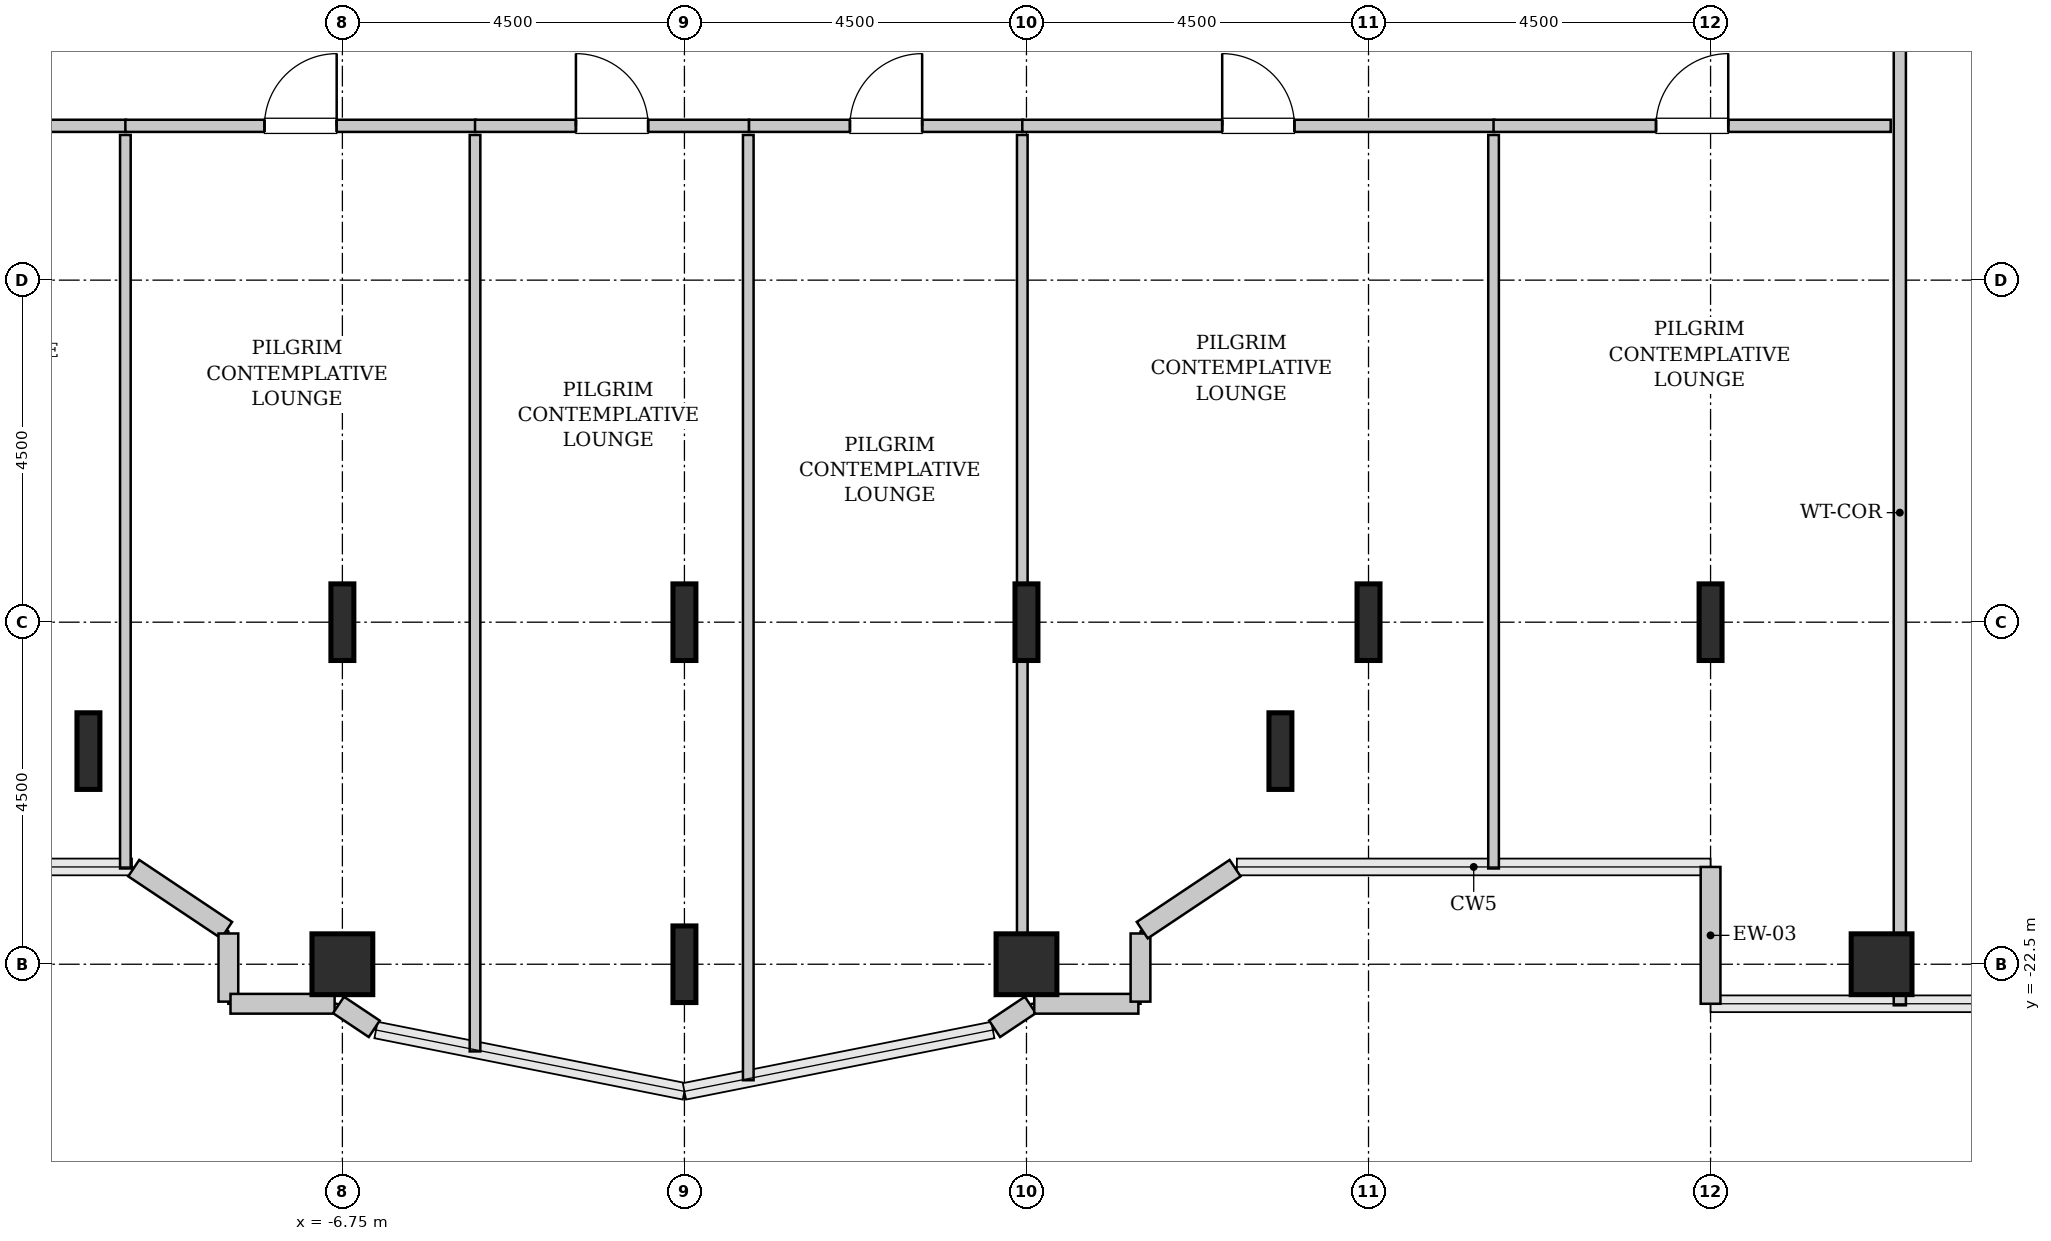
"""IFC4 building model, lengths in metres.
Left out: names, types, materials, properties, quantities, classifications, styles, units other than length and angle.
Written with IfcOpenShell. Run it as: python <this file> out.ifc"""

import sys

from ifc_helpers import new_model, si_unit, direction, frame, frame_2d, origin, origin_2d, place, context, subcontext, project, spatial, rectangle, hollow_rectangle, i_section, extrude, source, transform, mapped, element, fill, save


model = new_model("IFC4")
c1 = context("Model", 3, precision=1e-05, world=origin(), true_north=direction((0.0, 1.0)))
c2 = subcontext(c1, "Body", "Model", "MODEL_VIEW")
j1 = project(units=[si_unit("LENGTHUNIT", "METRE"), si_unit("PLANEANGLEUNIT", "RADIAN")], contexts=[c1])
p1 = place(None, origin())
s1 = spatial("IfcSite", under=j1, at=p1, CompositionType="ELEMENT")
p2 = place(p1, origin())
s2 = spatial("IfcBuilding", under=s1, at=p2, CompositionType="ELEMENT")
p3 = place(p2, frame((0.0, 0.0, 117.4)))
s3 = spatial("IfcBuildingStorey", under=s2, at=p3, CompositionType="ELEMENT", Elevation=117.4)
m1 = source(origin(), c2, "Body", "SweptSolid", [
    extrude(i_section(OverallWidth=0.302, OverallDepth=1.008, WebThickness=0.021, FlangeThickness=0.04, FilletRadius=0.03, at=origin_2d()), origin(), (0.0, 0.0, 1.0), 3.8),
])
p4 = place(p3, frame((-10.091, -19.696, 0.0), z_axis=(0.0, 0.0, 1.0), x_axis=(1.0, 0.0, 0.0)))
e1 = element("IfcColumn", 1, at=p4, inside=s3, PredefinedType="COLUMN", context=c2, shape_type="MappedRepresentation", body=[
    mapped(m1, transform((0.0, 0.0, 0.0), x_axis=(1.0, 0.0, 0.0), y_axis=(0.0, 1.0, 0.0), z_axis=(0.0, 0.0, 1.0), scale=1.0)),
])
m2 = source(origin(), c2, "Body", "SweptSolid", [
    extrude(hollow_rectangle(XDim=0.8, YDim=0.8, WallThickness=0.04, InnerFilletRadius=0.04, OuterFilletRadius=0.08, at=origin_2d()), origin(), (0.0, 0.0, 1.0), 3.8),
])
p5 = place(p3, frame((-6.75, -22.5, 0.0), z_axis=(0.0, 0.0, 1.0), x_axis=(1.0, 0.0, 0.0)))
e2 = element("IfcColumn", 2, at=p5, inside=s3, PredefinedType="COLUMN", context=c2, shape_type="MappedRepresentation", body=[
    mapped(m2, transform((0.0, 0.0, 0.0), x_axis=(1.0, 0.0, 0.0), y_axis=(0.0, 1.0, 0.0), z_axis=(0.0, 0.0, 1.0), scale=1.0)),
])
for number, where, z_axis, x_axis in (
    (3, (-6.75, -18.0, 0.0), (0.0, 0.0, 1.0), (1.0, 0.0, 0.0)),
    (4, (-2.25, -22.5, 0.0), (0.0, 0.0, 1.0), (1.0, 0.0, 0.0)),
    (5, (-2.25, -18.0, 0.0), (0.0, 0.0, 1.0), (1.0, 0.0, 0.0)),
):
    element("IfcColumn", number, at=place(p3, frame(where, z_axis=z_axis, x_axis=x_axis)), inside=s3, PredefinedType="COLUMN", context=c2, shape_type="MappedRepresentation", body=[
        mapped(m1, transform((0.0, 0.0, 0.0), x_axis=(1.0, 0.0, 0.0), y_axis=(0.0, 1.0, 0.0), z_axis=(0.0, 0.0, 1.0), scale=1.0)),
    ])
p6 = place(p3, frame((2.25, -22.5, 0.0), z_axis=(0.0, 0.0, 1.0), x_axis=(1.0, 0.0, 0.0)))
e6 = element("IfcColumn", 6, at=p6, inside=s3, PredefinedType="COLUMN", context=c2, shape_type="MappedRepresentation", body=[
    mapped(m2, transform((0.0, 0.0, 0.0), x_axis=(1.0, 0.0, 0.0), y_axis=(0.0, 1.0, 0.0), z_axis=(0.0, 0.0, 1.0), scale=1.0)),
])
for number, where, z_axis, x_axis in (
    (7, (2.25, -18.0, 0.0), (0.0, 0.0, 1.0), (1.0, 0.0, 0.0)),
    (8, (5.591, -19.696, 0.0), (0.0, 0.0, 1.0), (1.0, 0.0, 0.0)),
    (9, (6.75, -18.0, 0.0), (0.0, 0.0, 1.0), (1.0, 0.0, 0.0)),
    (10, (11.25, -18.0, 0.0), (0.0, 0.0, 1.0), (1.0, 0.0, 0.0)),
):
    element("IfcColumn", number, at=place(p3, frame(where, z_axis=z_axis, x_axis=x_axis)), inside=s3, PredefinedType="COLUMN", context=c2, shape_type="MappedRepresentation", body=[
        mapped(m1, transform((0.0, 0.0, 0.0), x_axis=(1.0, 0.0, 0.0), y_axis=(0.0, 1.0, 0.0), z_axis=(0.0, 0.0, 1.0), scale=1.0)),
    ])
p7 = place(p3, frame((13.5, -22.5, 0.0), z_axis=(0.0, 0.0, 1.0), x_axis=(1.0, 0.0, 0.0)))
e11 = element("IfcColumn", 11, at=p7, inside=s3, PredefinedType="COLUMN", context=c2, shape_type="MappedRepresentation", body=[
    mapped(m2, transform((0.0, 0.0, 0.0), x_axis=(1.0, 0.0, 0.0), y_axis=(0.0, 1.0, 0.0), z_axis=(0.0, 0.0, 1.0), scale=1.0)),
])
m3 = source(origin(), c2, "Body", "SweptSolid", [
    extrude(rectangle(XDim=1.8, YDim=0.26, at=frame_2d((0.9, 0.0))), origin(), (0.0, 0.0, 1.0), 3.55),
])
p8 = place(p3, frame((11.25, -21.22, 0.0), z_axis=(0.0, 0.0, 1.0), x_axis=(0.0, -1.0, 0.0)))
e12 = element("IfcWall", 12, at=p8, inside=s3, PredefinedType="SOLIDWALL", context=c2, shape_type="MappedRepresentation", body=[
    mapped(m3, transform((0.0, 0.0, 0.0), x_axis=(1.0, 0.0, 0.0), y_axis=(0.0, 1.0, 0.0), z_axis=(0.0, 0.0, 1.0), scale=1.0)),
])
m4 = source(origin(), c2, "Body", "SweptSolid", [
    extrude(rectangle(XDim=1.469, YDim=0.26, at=frame_2d((0.734, 0.0))), origin(), (0.0, 0.0, 1.0), 3.55),
])
p9 = place(p3, frame((-9.495, -21.236, 0.0), z_axis=(0.0, 0.0, 1.0), x_axis=(0.831461760506, -0.555581983884, 0.0)))
e13 = element("IfcWall", 13, at=p9, inside=s3, PredefinedType="SOLIDWALL", context=c2, shape_type="MappedRepresentation", body=[
    mapped(m4, transform((0.0, 0.0, 0.0), x_axis=(1.0, 0.0, 0.0), y_axis=(0.0, 1.0, 0.0), z_axis=(0.0, 0.0, 1.0), scale=1.0)),
])
m5 = source(origin(), c2, "Body", "SweptSolid", [
    extrude(rectangle(XDim=0.897, YDim=0.26, at=frame_2d((0.448, 0.0))), origin(), (0.0, 0.0, 1.0), 3.55),
])
p10 = place(p3, frame((-8.25, -22.095, 0.0), z_axis=(0.0, 0.0, 1.0), x_axis=(0.0, -1.0, 0.0)))
e14 = element("IfcWall", 14, at=p10, inside=s3, PredefinedType="SOLIDWALL", context=c2, shape_type="MappedRepresentation", body=[
    mapped(m5, transform((0.0, 0.0, 0.0), x_axis=(1.0, 0.0, 0.0), y_axis=(0.0, 1.0, 0.0), z_axis=(0.0, 0.0, 1.0), scale=1.0)),
])
m6 = source(origin(), c2, "Body", "SweptSolid", [
    extrude(rectangle(XDim=1.37, YDim=0.26, at=frame_2d((0.685, 0.0))), origin(), (0.0, 0.0, 1.0), 3.55),
])
p11 = place(p3, frame((-8.222, -23.02, 0.0), z_axis=(0.0, 0.0, 1.0), x_axis=(1.0, 0.0, 0.0)))
e15 = element("IfcWall", 15, at=p11, inside=s3, PredefinedType="SOLIDWALL", context=c2, shape_type="MappedRepresentation", body=[
    mapped(m6, transform((0.0, 0.0, 0.0), x_axis=(1.0, 0.0, 0.0), y_axis=(0.0, 1.0, 0.0), z_axis=(0.0, 0.0, 1.0), scale=1.0)),
])
m7 = source(origin(), c2, "Body", "SweptSolid", [
    extrude(rectangle(XDim=0.565, YDim=0.26, at=frame_2d((0.283, 0.0))), origin(), (0.0, 0.0, 1.0), 3.55),
])
for number, where, z_axis, x_axis in (
    (16, (-6.801, -23.036, 0.0), (0.0, 0.0, 1.0), (0.832, -0.555, 0.0)),
    (17, (1.831, -23.35, 0.0), (0.0, 0.0, 1.0), (0.832, 0.555, 0.0)),
):
    element("IfcWall", number, at=place(p3, frame(where, z_axis=z_axis, x_axis=x_axis)), inside=s3, PredefinedType="SOLIDWALL", context=c2, shape_type="MappedRepresentation", body=[
        mapped(m7, transform((0.0, 0.0, 0.0), x_axis=(1.0, 0.0, 0.0), y_axis=(0.0, 1.0, 0.0), z_axis=(0.0, 0.0, 1.0), scale=1.0)),
    ])
p12 = place(p3, frame((2.352, -23.02, 0.0), z_axis=(0.0, 0.0, 1.0), x_axis=(1.0, 0.0, 0.0)))
e18 = element("IfcWall", 18, at=p12, inside=s3, PredefinedType="SOLIDWALL", context=c2, shape_type="MappedRepresentation", body=[
    mapped(m6, transform((0.0, 0.0, 0.0), x_axis=(1.0, 0.0, 0.0), y_axis=(0.0, 1.0, 0.0), z_axis=(0.0, 0.0, 1.0), scale=1.0)),
])
p13 = place(p3, frame((3.75, -22.992, 0.0), z_axis=(0.0, 0.0, 1.0), x_axis=(0.0, 1.0, 0.0)))
e19 = element("IfcWall", 19, at=p13, inside=s3, PredefinedType="SOLIDWALL", context=c2, shape_type="MappedRepresentation", body=[
    mapped(m5, transform((0.0, 0.0, 0.0), x_axis=(1.0, 0.0, 0.0), y_axis=(0.0, 1.0, 0.0), z_axis=(0.0, 0.0, 1.0), scale=1.0)),
])
p14 = place(p3, frame((3.773, -22.052, 0.0), z_axis=(0.0, 0.0, 1.0), x_axis=(0.831461760506, 0.555581983884, 0.0)))
e20 = element("IfcWall", 20, at=p14, inside=s3, PredefinedType="SOLIDWALL", context=c2, shape_type="MappedRepresentation", body=[
    mapped(m4, transform((0.0, 0.0, 0.0), x_axis=(1.0, 0.0, 0.0), y_axis=(0.0, 1.0, 0.0), z_axis=(0.0, 0.0, 1.0), scale=1.0)),
])
m8 = source(origin(), c2, "Body", "SweptSolid", [
    extrude(rectangle(XDim=15.245, YDim=0.16, at=frame_2d((7.623, 0.0))), origin(), (0.0, 0.0, 1.0), 3.535),
])
p15 = place(p3, frame((13.74, -23.04, 0.0), z_axis=(0.0, 0.0, 1.0), x_axis=(0.0, 1.0, 0.0)))
e21 = element("IfcWall", 21, at=p15, inside=s3, PredefinedType="PARTITIONING", context=c2, shape_type="MappedRepresentation", body=[
    mapped(m8, transform((0.0, 0.0, 0.0), x_axis=(1.0, 0.0, 0.0), y_axis=(0.0, 1.0, 0.0), z_axis=(0.0, 0.0, 1.0), scale=1.0)),
])
p16 = place(p15, frame((12.913, 0.0, 0.0)))
e22 = element("IfcOpeningElement", 22, at=p16, cuts=e21, PredefinedType="OPENING", context=c2, shape_type="SweptSolid", body=[
    extrude(rectangle(XDim=0.95, YDim=2.1, at=frame_2d((0.475, 1.05))), frame((0.0, 0.09, 0.0), z_axis=(0.0, -1.0, 0.0), x_axis=(1.0, 0.0, 0.0)), (0.0, 0.0, 1.0), 0.18),
])
m9 = source(origin(), c2, "Body", "SweptSolid", [
    extrude(rectangle(XDim=4.025, YDim=0.16, at=frame_2d((2.013, 0.0))), origin(), (0.0, 0.0, 1.0), 3.535),
])
p17 = place(p3, frame((-13.62, -11.47, 0.0), z_axis=(0.0, 0.0, 1.0), x_axis=(1.0, 0.0, 0.0)))
e23 = element("IfcWall", 23, at=p17, inside=s3, PredefinedType="PARTITIONING", context=c2, shape_type="MappedRepresentation", body=[
    mapped(m9, transform((0.0, 0.0, 0.0), x_axis=(1.0, 0.0, 0.0), y_axis=(0.0, 1.0, 0.0), z_axis=(0.0, 0.0, 1.0), scale=1.0)),
])
p18 = place(p17, frame((1.538, 0.0, 0.0)))
e24 = element("IfcOpeningElement", 24, at=p18, cuts=e23, PredefinedType="OPENING", context=c2, shape_type="SweptSolid", body=[
    extrude(rectangle(XDim=0.95, YDim=2.1, at=frame_2d((0.475, 1.05))), frame((0.0, 0.09, 0.0), z_axis=(0.0, -1.0, 0.0), x_axis=(1.0, 0.0, 0.0)), (0.0, 0.0, 1.0), 0.18),
])
m10 = source(origin(), c2, "Body", "SweptSolid", [
    extrude(rectangle(XDim=9.65, YDim=0.14, at=frame_2d((4.825, 0.0))), origin(), (0.0, 0.0, 1.0), 3.535),
])
p19 = place(p3, frame((-9.605, -21.24, 0.0), z_axis=(0.0, 0.0, 1.0), x_axis=(0.0, 1.0, 0.0)))
e25 = element("IfcWall", 25, at=p19, inside=s3, PredefinedType="PARTITIONING", context=c2, shape_type="MappedRepresentation", body=[
    mapped(m10, transform((0.0, 0.0, 0.0), x_axis=(1.0, 0.0, 0.0), y_axis=(0.0, 1.0, 0.0), z_axis=(0.0, 0.0, 1.0), scale=1.0)),
])
m11 = source(origin(), c2, "Body", "SweptSolid", [
    extrude(rectangle(XDim=4.61, YDim=0.16, at=frame_2d((2.305, 0.0))), origin(), (0.0, 0.0, 1.0), 3.535),
])
p20 = place(p3, frame((-9.605, -11.47, 0.0), z_axis=(0.0, 0.0, 1.0), x_axis=(1.0, 0.0, 0.0)))
e26 = element("IfcWall", 26, at=p20, inside=s3, PredefinedType="PARTITIONING", context=c2, shape_type="MappedRepresentation", body=[
    mapped(m11, transform((0.0, 0.0, 0.0), x_axis=(1.0, 0.0, 0.0), y_axis=(0.0, 1.0, 0.0), z_axis=(0.0, 0.0, 1.0), scale=1.0)),
])
p21 = place(p20, frame((1.83, 0.0, 0.0)))
e27 = element("IfcOpeningElement", 27, at=p21, cuts=e26, PredefinedType="OPENING", context=c2, shape_type="SweptSolid", body=[
    extrude(rectangle(XDim=0.95, YDim=2.1, at=frame_2d((0.475, 1.05))), frame((0.0, 0.09, 0.0), z_axis=(0.0, -1.0, 0.0), x_axis=(1.0, 0.0, 0.0)), (0.0, 0.0, 1.0), 0.18),
])
m12 = source(origin(), c2, "Body", "SweptSolid", [
    extrude(rectangle(XDim=12.057, YDim=0.14, at=frame_2d((6.028, 0.0))), origin(), (0.0, 0.0, 1.0), 3.535),
])
p22 = place(p3, frame((-5.005, -23.647, 0.0), z_axis=(0.0, 0.0, 1.0), x_axis=(0.0, 1.0, 0.0)))
e28 = element("IfcWall", 28, at=p22, inside=s3, PredefinedType="PARTITIONING", context=c2, shape_type="MappedRepresentation", body=[
    mapped(m12, transform((0.0, 0.0, 0.0), x_axis=(1.0, 0.0, 0.0), y_axis=(0.0, 1.0, 0.0), z_axis=(0.0, 0.0, 1.0), scale=1.0)),
])
m13 = source(origin(), c2, "Body", "SweptSolid", [
    extrude(rectangle(XDim=3.605, YDim=0.16, at=frame_2d((1.802, 0.0))), origin(), (0.0, 0.0, 1.0), 3.535),
])
p23 = place(p3, frame((-5.005, -11.47, 0.0), z_axis=(0.0, 0.0, 1.0), x_axis=(1.0, 0.0, 0.0)))
e29 = element("IfcWall", 29, at=p23, inside=s3, PredefinedType="PARTITIONING", context=c2, shape_type="MappedRepresentation", body=[
    mapped(m13, transform((0.0, 0.0, 0.0), x_axis=(1.0, 0.0, 0.0), y_axis=(0.0, 1.0, 0.0), z_axis=(0.0, 0.0, 1.0), scale=1.0)),
])
p24 = place(p23, frame((1.327, 0.0, 0.0)))
e30 = element("IfcOpeningElement", 30, at=p24, cuts=e29, PredefinedType="OPENING", context=c2, shape_type="SweptSolid", body=[
    extrude(rectangle(XDim=0.95, YDim=2.1, at=frame_2d((0.475, 1.05))), frame((0.0, 0.09, 0.0), z_axis=(0.0, -1.0, 0.0), x_axis=(1.0, 0.0, 0.0)), (0.0, 0.0, 1.0), 0.18),
])
m14 = source(origin(), c2, "Body", "SweptSolid", [
    extrude(rectangle(XDim=12.436, YDim=0.14, at=frame_2d((6.218, 0.0))), origin(), (0.0, 0.0, 1.0), 3.535),
])
p25 = place(p3, frame((-1.41, -24.026, 0.0), z_axis=(0.0, 0.0, 1.0), x_axis=(0.0, 1.0, 0.0)))
e31 = element("IfcWall", 31, at=p25, inside=s3, PredefinedType="PARTITIONING", context=c2, shape_type="MappedRepresentation", body=[
    mapped(m14, transform((0.0, 0.0, 0.0), x_axis=(1.0, 0.0, 0.0), y_axis=(0.0, 1.0, 0.0), z_axis=(0.0, 0.0, 1.0), scale=1.0)),
])
p26 = place(p3, frame((-1.4, -11.47, 0.0), z_axis=(0.0, 0.0, 1.0), x_axis=(1.0, 0.0, 0.0)))
e32 = element("IfcWall", 32, at=p26, inside=s3, PredefinedType="PARTITIONING", context=c2, shape_type="MappedRepresentation", body=[
    mapped(m13, transform((0.0, 0.0, 0.0), x_axis=(1.0, 0.0, 0.0), y_axis=(0.0, 1.0, 0.0), z_axis=(0.0, 0.0, 1.0), scale=1.0)),
])
p27 = place(p26, frame((1.327, 0.0, 0.0)))
e33 = element("IfcOpeningElement", 33, at=p27, cuts=e32, PredefinedType="OPENING", context=c2, shape_type="SweptSolid", body=[
    extrude(rectangle(XDim=0.95, YDim=2.1, at=frame_2d((0.475, 1.05))), frame((0.0, 0.09, 0.0), z_axis=(0.0, -1.0, 0.0), x_axis=(1.0, 0.0, 0.0)), (0.0, 0.0, 1.0), 0.18),
])
m15 = source(origin(), c2, "Body", "SweptSolid", [
    extrude(rectangle(XDim=11.314, YDim=0.14, at=frame_2d((5.657, 0.0))), origin(), (0.0, 0.0, 1.0), 2.875),
])
p28 = place(p3, frame((2.195, -22.904, 0.0), z_axis=(0.0, 0.0, 1.0), x_axis=(0.0, 1.0, 0.0)))
e34 = element("IfcWall", 34, at=p28, inside=s3, PredefinedType="PARTITIONING", context=c2, shape_type="MappedRepresentation", body=[
    mapped(m15, transform((0.0, 0.0, 0.0), x_axis=(1.0, 0.0, 0.0), y_axis=(0.0, 1.0, 0.0), z_axis=(0.0, 0.0, 1.0), scale=1.0)),
])
m16 = source(origin(), c2, "Body", "SweptSolid", [
    extrude(rectangle(XDim=6.21, YDim=0.16, at=frame_2d((3.105, 0.0))), origin(), (0.0, 0.0, 1.0), 3.535),
])
p29 = place(p3, frame((2.195, -11.47, 0.0), z_axis=(0.0, 0.0, 1.0), x_axis=(1.0, 0.0, 0.0)))
e35 = element("IfcWall", 35, at=p29, inside=s3, PredefinedType="PARTITIONING", context=c2, shape_type="MappedRepresentation", body=[
    mapped(m16, transform((0.0, 0.0, 0.0), x_axis=(1.0, 0.0, 0.0), y_axis=(0.0, 1.0, 0.0), z_axis=(0.0, 0.0, 1.0), scale=1.0)),
])
p30 = place(p29, frame((2.63, 0.0, 0.0)))
e36 = element("IfcOpeningElement", 36, at=p30, cuts=e35, PredefinedType="OPENING", context=c2, shape_type="SweptSolid", body=[
    extrude(rectangle(XDim=0.95, YDim=2.1, at=frame_2d((0.475, 1.05))), frame((0.0, 0.09, 0.0), z_axis=(0.0, -1.0, 0.0), x_axis=(1.0, 0.0, 0.0)), (0.0, 0.0, 1.0), 0.18),
])
p31 = place(p3, frame((8.395, -21.24, 0.0), z_axis=(0.0, 0.0, 1.0), x_axis=(0.0, 1.0, 0.0)))
e37 = element("IfcWall", 37, at=p31, inside=s3, PredefinedType="PARTITIONING", context=c2, shape_type="MappedRepresentation", body=[
    mapped(m10, transform((0.0, 0.0, 0.0), x_axis=(1.0, 0.0, 0.0), y_axis=(0.0, 1.0, 0.0), z_axis=(0.0, 0.0, 1.0), scale=1.0)),
])
m17 = source(origin(), c2, "Body", "SweptSolid", [
    extrude(rectangle(XDim=5.225, YDim=0.16, at=frame_2d((2.613, 0.0))), origin(), (0.0, 0.0, 1.0), 3.535),
])
p32 = place(p3, frame((8.395, -11.47, 0.0), z_axis=(0.0, 0.0, 1.0), x_axis=(1.0, 0.0, 0.0)))
e38 = element("IfcWall", 38, at=p32, inside=s3, PredefinedType="PARTITIONING", context=c2, shape_type="MappedRepresentation", body=[
    mapped(m17, transform((0.0, 0.0, 0.0), x_axis=(1.0, 0.0, 0.0), y_axis=(0.0, 1.0, 0.0), z_axis=(0.0, 0.0, 1.0), scale=1.0)),
])
p33 = place(p32, frame((2.137, 0.0, 0.0)))
e39 = element("IfcOpeningElement", 39, at=p33, cuts=e38, PredefinedType="OPENING", context=c2, shape_type="SweptSolid", body=[
    extrude(rectangle(XDim=0.95, YDim=2.1, at=frame_2d((0.475, 1.05))), frame((0.0, 0.09, 0.0), z_axis=(0.0, -1.0, 0.0), x_axis=(1.0, 0.0, 0.0)), (0.0, 0.0, 1.0), 0.18),
])
m18 = source(origin(), c2, "Body", "SweptSolid", [
    extrude(rectangle(XDim=0.95, YDim=2.1, at=frame_2d((0.475, 1.05))), frame((0.0, 0.025, 0.0), z_axis=(0.0, -1.0, 0.0), x_axis=(1.0, 0.0, 0.0)), (0.0, 0.0, 1.0), 0.05),
])
p34 = place(p21, origin())
e40 = element("IfcDoor", 40, at=p34, inside=s3, OperationType="SINGLE_SWING_RIGHT", PredefinedType="DOOR", context=c2, shape_type="MappedRepresentation", body=[
    mapped(m18, transform((0.0, 0.0, 0.0), x_axis=(1.0, 0.0, 0.0), y_axis=(0.0, 1.0, 0.0), z_axis=(0.0, 0.0, 1.0), scale=1.0)),
])
fill(e27, e40)
p35 = place(p24, origin())
e41 = element("IfcDoor", 41, at=p35, inside=s3, OperationType="SINGLE_SWING_LEFT", PredefinedType="DOOR", context=c2, shape_type="MappedRepresentation", body=[
    mapped(m18, transform((0.0, 0.0, 0.0), x_axis=(1.0, 0.0, 0.0), y_axis=(0.0, 1.0, 0.0), z_axis=(0.0, 0.0, 1.0), scale=1.0)),
])
fill(e30, e41)
p36 = place(p27, origin())
e42 = element("IfcDoor", 42, at=p36, inside=s3, OperationType="SINGLE_SWING_RIGHT", PredefinedType="DOOR", context=c2, shape_type="MappedRepresentation", body=[
    mapped(m18, transform((0.0, 0.0, 0.0), x_axis=(1.0, 0.0, 0.0), y_axis=(0.0, 1.0, 0.0), z_axis=(0.0, 0.0, 1.0), scale=1.0)),
])
fill(e33, e42)
p37 = place(p30, origin())
e43 = element("IfcDoor", 43, at=p37, inside=s3, OperationType="SINGLE_SWING_LEFT", PredefinedType="DOOR", context=c2, shape_type="MappedRepresentation", body=[
    mapped(m18, transform((0.0, 0.0, 0.0), x_axis=(1.0, 0.0, 0.0), y_axis=(0.0, 1.0, 0.0), z_axis=(0.0, 0.0, 1.0), scale=1.0)),
])
fill(e36, e43)
p38 = place(p33, origin())
e44 = element("IfcDoor", 44, at=p38, inside=s3, OperationType="SINGLE_SWING_RIGHT", PredefinedType="DOOR", context=c2, shape_type="MappedRepresentation", body=[
    mapped(m18, transform((0.0, 0.0, 0.0), x_axis=(1.0, 0.0, 0.0), y_axis=(0.0, 1.0, 0.0), z_axis=(0.0, 0.0, 1.0), scale=1.0)),
])
fill(e39, e44)
save(model, sys.argv[1])
